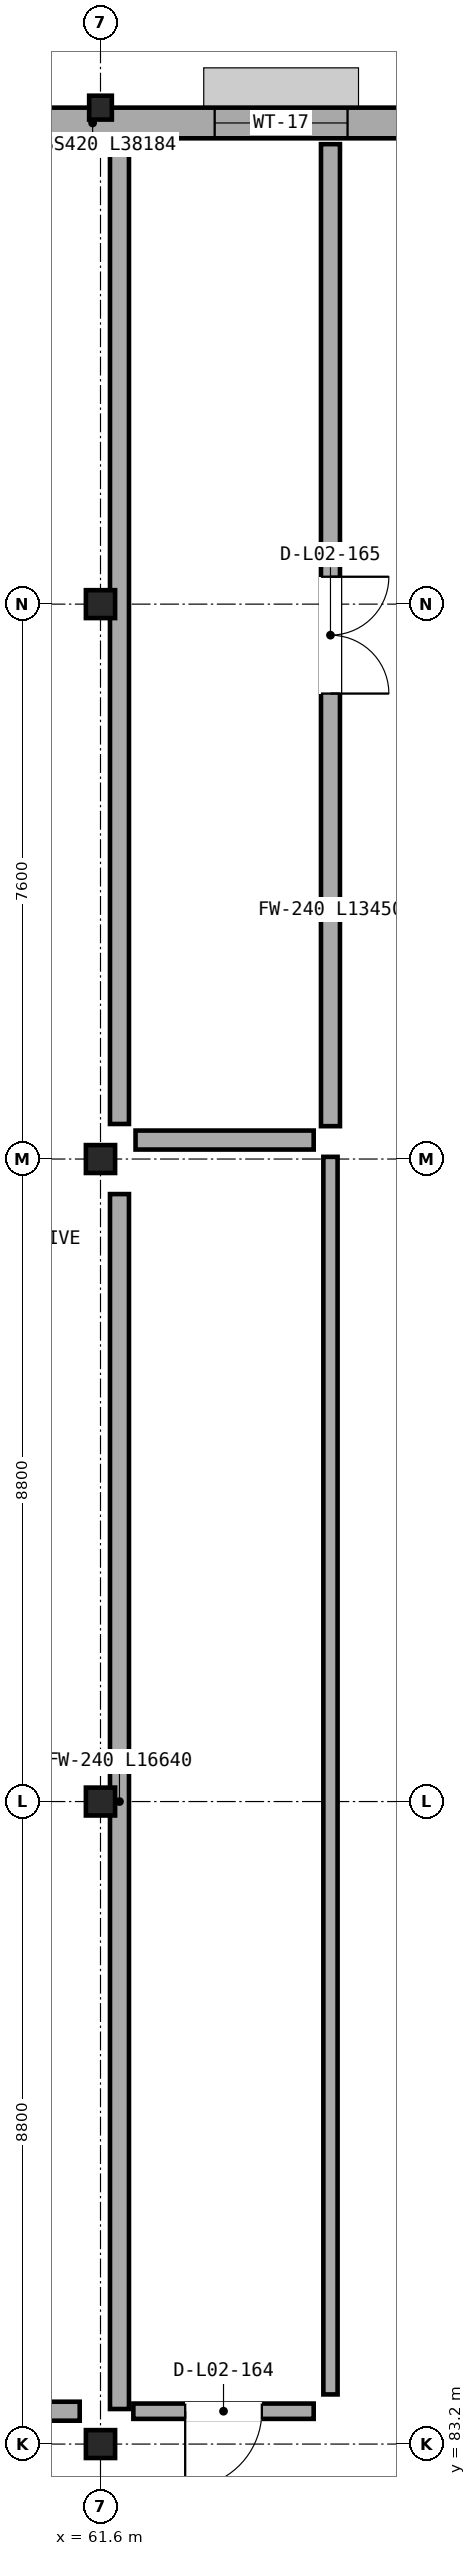
"""IFC4 building model, lengths in metres.
Left out: names, types, materials, properties, quantities, classifications, styles, units other than length and angle.
Written with IfcOpenShell. Run it as: python <this file> out.ifc"""

import sys

from ifc_helpers import new_model, si_unit, direction, frame, frame_2d, origin, origin_2d, place, context, subcontext, project, spatial, rectangle, i_section, extrude, element, fill, save


model = new_model("IFC4")
c1 = context("Model", 3, precision=1e-05, world=origin(), true_north=direction((0.0, 1.0)))
c2 = subcontext(c1, "Body", "Model", "MODEL_VIEW")
j1 = project(units=[si_unit("LENGTHUNIT", "METRE"), si_unit("PLANEANGLEUNIT", "RADIAN")], contexts=[c1])
p1 = place(None, origin())
s1 = spatial("IfcSite", under=j1, at=p1, CompositionType="ELEMENT")
p2 = place(p1, origin())
s2 = spatial("IfcBuilding", under=s1, at=p2, CompositionType="ELEMENT")
p3 = place(p2, frame((0.0, 0.0, 10.1)))
s3 = spatial("IfcBuildingStorey", under=s2, at=p3, CompositionType="ELEMENT", Elevation=10.1)
for number, where, z_axis, x_axis in (
    (1, (61.6, 83.2, 0.0), (0.0, 0.0, 1.0), (1.0, 0.0, 0.0)),
    (2, (61.6, 92.0, 0.0), (0.0, 0.0, 1.0), (1.0, 0.0, 0.0)),
    (3, (61.6, 100.8, 0.0), (0.0, 0.0, 1.0), (1.0, 0.0, 0.0)),
    (4, (61.6, 108.4, 0.0), (0.0, 0.0, 1.0), (1.0, 0.0, 0.0)),
):
    element("IfcColumn", number, at=place(p3, frame(where, z_axis=z_axis, x_axis=x_axis)), inside=s3, PredefinedType="COLUMN", context=c2, shape_type="SweptSolid", body=[
        extrude(i_section(OverallWidth=0.4, OverallDepth=0.382, WebThickness=0.025, FlangeThickness=0.036, at=origin_2d()), origin(), (0.0, 0.0, 1.0), 4.5),
    ])
p4 = place(p3, frame((61.6, 115.2, 0.0), z_axis=(0.0, 0.0, 1.0), x_axis=(1.0, 0.0, 0.0)))
e5 = element("IfcColumn", 5, at=p4, inside=s3, PredefinedType="COLUMN", context=c2, shape_type="SweptSolid", body=[
    extrude(i_section(OverallWidth=0.311, OverallDepth=0.327, WebThickness=0.016, FlangeThickness=0.025, FilletRadius=0.017, at=origin_2d()), origin(), (0.0, 0.0, 1.0), 4.5),
])
p5 = place(p3, frame((80.584, 114.99, 0.0), z_axis=(0.0, 0.0, 1.0), x_axis=(-1.0, 0.0, 0.0)))
e6 = element("IfcWall", 6, at=p5, inside=s3, PredefinedType="SOLIDWALL", context=c2, shape_type="SweptSolid", body=[
    extrude(rectangle(XDim=38.184, YDim=0.42, at=frame_2d((19.092, 0.0))), origin(), (0.0, 0.0, 1.0), 3.738),
])
p6 = place(p5, frame((1.8, 0.0, 0.9)))
e7 = element("IfcOpeningElement", 7, at=p6, cuts=e6, PredefinedType="OPENING", context=c2, shape_type="SweptSolid", body=[
    extrude(rectangle(XDim=1.4, YDim=1.85, at=frame_2d((0.7, 0.925))), frame((0.0, 0.22, 0.0), z_axis=(0.0, -1.0, 0.0), x_axis=(1.0, 0.0, 0.0)), (0.0, 0.0, 1.0), 0.44),
])
p7 = place(p5, frame((6.4, 0.0, 0.9)))
e8 = element("IfcOpeningElement", 8, at=p7, cuts=e6, PredefinedType="OPENING", context=c2, shape_type="SweptSolid", body=[
    extrude(rectangle(XDim=1.55, YDim=1.85, at=frame_2d((0.775, 0.925))), frame((0.0, 0.22, 0.0), z_axis=(0.0, -1.0, 0.0), x_axis=(1.0, 0.0, 0.0)), (0.0, 0.0, 1.0), 0.44),
])
p8 = place(p5, frame((15.6, 0.0, 0.9)))
e9 = element("IfcOpeningElement", 9, at=p8, cuts=e6, PredefinedType="OPENING", context=c2, shape_type="SweptSolid", body=[
    extrude(rectangle(XDim=1.82, YDim=1.85, at=frame_2d((0.91, 0.925))), frame((0.0, 0.22, 0.0), z_axis=(0.0, -1.0, 0.0), x_axis=(1.0, 0.0, 0.0)), (0.0, 0.0, 1.0), 0.44),
])
p9 = place(p5, frame((20.2, 0.0, 0.9)))
e10 = element("IfcOpeningElement", 10, at=p9, cuts=e6, PredefinedType="OPENING", context=c2, shape_type="SweptSolid", body=[
    extrude(rectangle(XDim=1.85, YDim=1.85, at=frame_2d((0.925, 0.925))), frame((0.0, 0.22, 0.0), z_axis=(0.0, -1.0, 0.0), x_axis=(1.0, 0.0, 0.0)), (0.0, 0.0, 1.0), 0.44),
])
p10 = place(p5, frame((24.8, 0.0, 0.9)))
e11 = element("IfcOpeningElement", 11, at=p10, cuts=e6, PredefinedType="OPENING", context=c2, shape_type="SweptSolid", body=[
    extrude(rectangle(XDim=2.12, YDim=1.85, at=frame_2d((1.06, 0.925))), frame((0.0, 0.22, 0.0), z_axis=(0.0, -1.0, 0.0), x_axis=(1.0, 0.0, 0.0)), (0.0, 0.0, 1.0), 0.44),
])
p11 = place(p5, frame((29.4, 0.0, 0.9)))
e12 = element("IfcOpeningElement", 12, at=p11, cuts=e6, PredefinedType="OPENING", context=c2, shape_type="SweptSolid", body=[
    extrude(rectangle(XDim=2.2, YDim=1.85, at=frame_2d((1.1, 0.925))), frame((0.0, 0.22, 0.0), z_axis=(0.0, -1.0, 0.0), x_axis=(1.0, 0.0, 0.0)), (0.0, 0.0, 1.0), 0.44),
])
p12 = place(p3, frame((61.315, 83.65, 0.0), z_axis=(0.0, 0.0, 1.0), x_axis=(-1.0, 0.0, 0.0)))
e13 = element("IfcWall", 13, at=p12, inside=s3, PredefinedType="SOLIDWALL", context=c2, shape_type="SweptSolid", body=[
    extrude(rectangle(XDim=9.031, YDim=0.26, at=frame_2d((4.515, 0.0))), origin(), (0.0, 0.0, 1.0), 3.723),
])
p13 = place(p3, frame((64.52, 83.65, 0.0), z_axis=(0.0, 0.0, 1.0), x_axis=(-1.0, 0.0, 0.0)))
e14 = element("IfcWall", 14, at=p13, inside=s3, PredefinedType="PARTITIONING", context=c2, shape_type="SweptSolid", body=[
    extrude(rectangle(XDim=2.47, YDim=0.21, at=frame_2d((1.235, 0.0))), origin(), (0.0, 0.0, 1.0), 3.924),
])
p14 = place(p13, frame((0.71, 0.0, 0.0)))
e15 = element("IfcOpeningElement", 15, at=p14, cuts=e14, PredefinedType="OPENING", context=c2, shape_type="SweptSolid", body=[
    extrude(rectangle(XDim=1.05, YDim=2.15, at=frame_2d((0.525, 1.075))), frame((0.0, 0.115, 0.0), z_axis=(0.0, -1.0, 0.0), x_axis=(1.0, 0.0, 0.0)), (0.0, 0.0, 1.0), 0.23),
])
p15 = place(p3, frame((64.75, 100.83, 0.0), z_axis=(0.0, 0.0, 1.0), x_axis=(0.0, -1.0, 0.0)))
e16 = element("IfcWall", 16, at=p15, inside=s3, PredefinedType="PARTITIONING", context=c2, shape_type="SweptSolid", body=[
    extrude(rectangle(XDim=16.95, YDim=0.195, at=frame_2d((8.475, 0.0))), origin(), (0.0, 0.0, 1.0), 3.573),
])
p16 = place(p3, frame((64.75, 114.7, 0.0), z_axis=(0.0, 0.0, 1.0), x_axis=(0.0, -1.0, 0.0)))
e17 = element("IfcWall", 17, at=p16, inside=s3, PredefinedType="SOLIDWALL", context=c2, shape_type="SweptSolid", body=[
    extrude(rectangle(XDim=13.45, YDim=0.26, at=frame_2d((6.725, 0.0))), origin(), (0.0, 0.0, 1.0), 3.573),
])
p17 = place(p16, frame((5.925, 0.0, 0.0)))
e18 = element("IfcOpeningElement", 18, at=p17, cuts=e17, PredefinedType="OPENING", context=c2, shape_type="SweptSolid", body=[
    extrude(rectangle(XDim=1.6, YDim=2.4, at=frame_2d((0.8, 1.2))), frame((0.0, 0.14, 0.0), z_axis=(0.0, -1.0, 0.0), x_axis=(1.0, 0.0, 0.0)), (0.0, 0.0, 1.0), 0.28),
])
p18 = place(p3, frame((61.86, 100.32, 0.0), z_axis=(0.0, 0.0, 1.0), x_axis=(0.0, -1.0, 0.0)))
e19 = element("IfcWall", 19, at=p18, inside=s3, PredefinedType="SOLIDWALL", context=c2, shape_type="SweptSolid", body=[
    extrude(rectangle(XDim=16.64, YDim=0.26, at=frame_2d((8.32, 0.0))), origin(), (0.0, 0.0, 1.0), 3.573),
])
p19 = place(p3, frame((61.86, 114.7, 0.0), z_axis=(0.0, 0.0, 1.0), x_axis=(0.0, -1.0, 0.0)))
e20 = element("IfcWall", 20, at=p19, inside=s3, PredefinedType="SOLIDWALL", context=c2, shape_type="SweptSolid", body=[
    extrude(rectangle(XDim=13.42, YDim=0.26, at=frame_2d((6.71, 0.0))), origin(), (0.0, 0.0, 1.0), 3.573),
])
p20 = place(p3, frame((62.08, 101.06, 0.0), z_axis=(0.0, 0.0, 1.0), x_axis=(1.0, 0.0, 0.0)))
e21 = element("IfcWall", 21, at=p20, inside=s3, PredefinedType="SOLIDWALL", context=c2, shape_type="SweptSolid", body=[
    extrude(rectangle(XDim=2.44, YDim=0.26, at=frame_2d((1.22, 0.0))), origin(), (0.0, 0.0, 1.0), 3.573),
])
p21 = place(p8, origin())
e22 = element("IfcWindow", 22, at=p21, inside=s3, PartitioningType="SINGLE_PANEL", PredefinedType="WINDOW", context=c2, shape_type="SweptSolid", body=[
    extrude(rectangle(XDim=1.82, YDim=1.85, at=frame_2d((0.91, 0.925))), frame((0.0, 0.03, 0.0), z_axis=(0.0, -1.0, 0.0), x_axis=(1.0, 0.0, 0.0)), (0.0, 0.0, 1.0), 0.06),
])
fill(e9, e22)
p22 = place(p14, origin())
e23 = element("IfcDoor", 23, at=p22, inside=s3, OperationType="SINGLE_SWING_RIGHT", PredefinedType="DOOR", context=c2, shape_type="SweptSolid", body=[
    extrude(rectangle(XDim=1.05, YDim=2.15, at=frame_2d((0.525, 1.075))), frame((0.0, 0.025, 0.0), z_axis=(0.0, -1.0, 0.0), x_axis=(1.0, 0.0, 0.0)), (0.0, 0.0, 1.0), 0.05),
])
fill(e15, e23)
p23 = place(p17, origin())
e24 = element("IfcDoor", 24, at=p23, inside=s3, OperationType="DOUBLE_DOOR_SINGLE_SWING", PredefinedType="DOOR", context=c2, shape_type="SweptSolid", body=[
    extrude(rectangle(XDim=1.6, YDim=2.4, at=frame_2d((0.8, 1.2))), frame((0.0, 0.025, 0.0), z_axis=(0.0, -1.0, 0.0), x_axis=(1.0, 0.0, 0.0)), (0.0, 0.0, 1.0), 0.05),
])
fill(e18, e24)
save(model, sys.argv[1])
